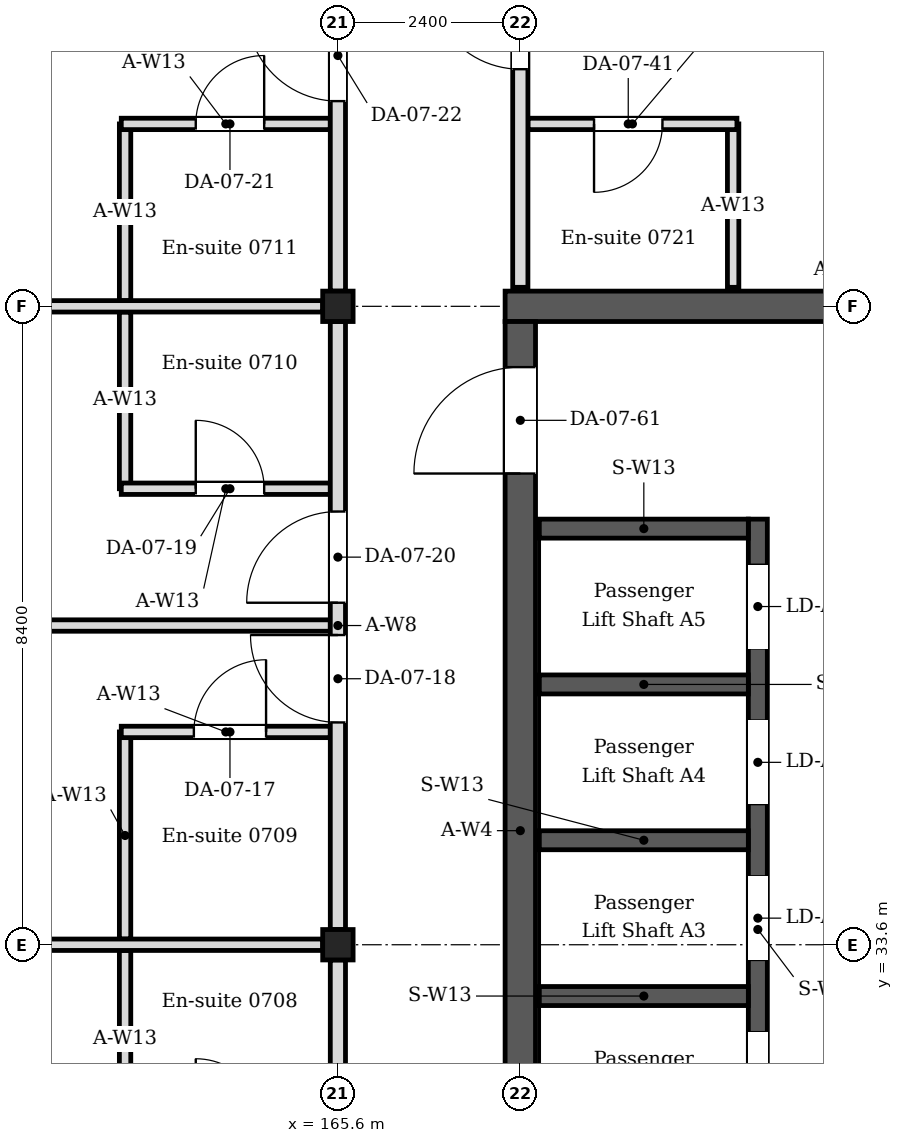
"""IFC4 building model, lengths in metres.
Left out: names, types, materials, properties, quantities, classifications, styles, units other than length and angle.
Written with IfcOpenShell. Run it as: python <this file> out.ifc"""

import sys

from ifc_helpers import new_model, si_unit, direction, frame, frame_2d, origin, origin_2d, place, context, subcontext, project, spatial, rectangle, i_section, extrude, element, fill, save


model = new_model("IFC4")
c1 = context("Model", 3, precision=1e-05, world=origin(), true_north=direction((0.0, 1.0)))
c2 = subcontext(c1, "Body", "Model", "MODEL_VIEW")
j1 = project(units=[si_unit("LENGTHUNIT", "METRE"), si_unit("PLANEANGLEUNIT", "RADIAN")], contexts=[c1])
p1 = place(None, origin())
s1 = spatial("IfcSite", under=j1, at=p1, CompositionType="ELEMENT")
p2 = place(p1, origin())
s2 = spatial("IfcBuilding", under=s1, at=p2, CompositionType="ELEMENT")
p3 = place(p2, frame((0.0, 0.0, 31.2)))
s3 = spatial("IfcBuildingStorey", under=s2, at=p3, CompositionType="ELEMENT", Elevation=31.2)
for number, where, z_axis, x_axis in (
    (1, (165.6, 33.6, 0.0), (0.0, 0.0, 1.0), (1.0, 0.0, 0.0)),
    (2, (165.6, 42.0, 0.0), (0.0, 0.0, 1.0), (1.0, 0.0, 0.0)),
):
    element("IfcColumn", number, at=place(p3, frame(where, z_axis=z_axis, x_axis=x_axis)), inside=s3, PredefinedType="COLUMN", context=c2, shape_type="SweptSolid", body=[
        extrude(i_section(OverallWidth=0.4, OverallDepth=0.4, WebThickness=0.013, FlangeThickness=0.021, FilletRadius=0.022, at=origin_2d()), origin(), (0.0, 0.0, 1.0), 4.2),
    ])
p4 = place(p3, frame((167.8, 42.0, 0.0), z_axis=(0.0, 0.0, 1.0), x_axis=(1.0, 0.0, 0.0)))
e3 = element("IfcWall", 3, at=p4, inside=s3, PredefinedType="SOLIDWALL", context=c2, shape_type="SweptSolid", body=[
    extrude(rectangle(XDim=8.8, YDim=0.4, at=frame_2d((4.4, 0.0))), origin(), (0.0, 0.0, 1.0), 4.05),
])
p5 = place(p3, frame((168.0, 25.4, 0.0), z_axis=(0.0, 0.0, 1.0), x_axis=(0.0, 1.0, 0.0)))
e4 = element("IfcWall", 4, at=p5, inside=s3, PredefinedType="SOLIDWALL", context=c2, shape_type="SweptSolid", body=[
    extrude(rectangle(XDim=16.4, YDim=0.4, at=frame_2d((8.2, 0.0))), origin(), (0.0, 0.0, 1.0), 4.05),
])
p6 = place(p5, frame((1.0, 0.0, 0.0)))
e5 = element("IfcOpeningElement", 5, at=p6, cuts=e4, PredefinedType="OPENING", context=c2, shape_type="SweptSolid", body=[
    extrude(rectangle(XDim=1.0, YDim=2.1, at=frame_2d((0.5, 1.05))), frame((0.0, 0.21, 0.0), z_axis=(0.0, -1.0, 0.0), x_axis=(1.0, 0.0, 0.0)), (0.0, 0.0, 1.0), 0.42),
])
p7 = place(p5, frame((14.4, 0.0, 0.0)))
e6 = element("IfcOpeningElement", 6, at=p7, cuts=e4, PredefinedType="OPENING", context=c2, shape_type="SweptSolid", body=[
    extrude(rectangle(XDim=1.4, YDim=2.1, at=frame_2d((0.7, 1.05))), frame((0.0, 0.21, 0.0), z_axis=(0.0, -1.0, 0.0), x_axis=(1.0, 0.0, 0.0)), (0.0, 0.0, 1.0), 0.42),
])
p8 = place(p3, frame((162.8, 31.2, 0.0), z_axis=(0.0, 0.0, 1.0), x_axis=(0.0, 1.0, 0.0)))
e7 = element("IfcWall", 7, at=p8, inside=s3, PredefinedType="PARTITIONING", context=c2, shape_type="SweptSolid", body=[
    extrude(rectangle(XDim=2.325, YDim=0.15, at=frame_2d((1.163, 0.0))), origin(), (0.0, 0.0, 1.0), 4.05),
])
p9 = place(p3, frame((162.8, 33.675, 0.0), z_axis=(0.0, 0.0, 1.0), x_axis=(0.0, 1.0, 0.0)))
e8 = element("IfcWall", 8, at=p9, inside=s3, PredefinedType="PARTITIONING", context=c2, shape_type="SweptSolid", body=[
    extrude(rectangle(XDim=2.725, YDim=0.15, at=frame_2d((1.362, 0.0))), origin(), (0.0, 0.0, 1.0), 4.05),
])
p10 = place(p3, frame((162.75, 36.4, 0.0), z_axis=(0.0, 0.0, 1.0), x_axis=(1.0, 0.0, 0.0)))
e9 = element("IfcWall", 9, at=p10, inside=s3, PredefinedType="PARTITIONING", context=c2, shape_type="SweptSolid", body=[
    extrude(rectangle(XDim=2.75, YDim=0.15, at=frame_2d((1.375, 0.0))), origin(), (0.0, 0.0, 1.0), 4.05),
])
p11 = place(p10, frame((0.955, 0.0, 0.0)))
e10 = element("IfcOpeningElement", 10, at=p11, cuts=e9, PredefinedType="OPENING", context=c2, shape_type="SweptSolid", body=[
    extrude(rectangle(XDim=0.95, YDim=2.1, at=frame_2d((0.475, 1.05))), frame((0.0, 0.085, 0.0), z_axis=(0.0, -1.0, 0.0), x_axis=(1.0, 0.0, 0.0)), (0.0, 0.0, 1.0), 0.17),
])
p12 = place(p3, frame((162.8, 39.6, 0.0), z_axis=(0.0, 0.0, 1.0), x_axis=(0.0, 1.0, 0.0)))
e11 = element("IfcWall", 11, at=p12, inside=s3, PredefinedType="PARTITIONING", context=c2, shape_type="SweptSolid", body=[
    extrude(rectangle(XDim=2.325, YDim=0.15, at=frame_2d((1.163, 0.0))), origin(), (0.0, 0.0, 1.0), 4.05),
])
p13 = place(p3, frame((162.75, 39.6, 0.0), z_axis=(0.0, 0.0, 1.0), x_axis=(1.0, 0.0, 0.0)))
e12 = element("IfcWall", 12, at=p13, inside=s3, PredefinedType="PARTITIONING", context=c2, shape_type="SweptSolid", body=[
    extrude(rectangle(XDim=2.75, YDim=0.15, at=frame_2d((1.375, 0.0))), origin(), (0.0, 0.0, 1.0), 4.05),
])
p14 = place(p13, frame((0.98, 0.0, 0.0)))
e13 = element("IfcOpeningElement", 13, at=p14, cuts=e12, PredefinedType="OPENING", context=c2, shape_type="SweptSolid", body=[
    extrude(rectangle(XDim=0.9, YDim=2.1, at=frame_2d((0.45, 1.05))), frame((0.0, 0.085, 0.0), z_axis=(0.0, -1.0, 0.0), x_axis=(1.0, 0.0, 0.0)), (0.0, 0.0, 1.0), 0.17),
])
p15 = place(p3, frame((162.8, 42.075, 0.0), z_axis=(0.0, 0.0, 1.0), x_axis=(0.0, 1.0, 0.0)))
e14 = element("IfcWall", 14, at=p15, inside=s3, PredefinedType="PARTITIONING", context=c2, shape_type="SweptSolid", body=[
    extrude(rectangle(XDim=2.325, YDim=0.15, at=frame_2d((1.163, 0.0))), origin(), (0.0, 0.0, 1.0), 4.05),
])
p16 = place(p3, frame((162.75, 44.4, 0.0), z_axis=(0.0, 0.0, 1.0), x_axis=(1.0, 0.0, 0.0)))
e15 = element("IfcWall", 15, at=p16, inside=s3, PredefinedType="PARTITIONING", context=c2, shape_type="SweptSolid", body=[
    extrude(rectangle(XDim=2.75, YDim=0.15, at=frame_2d((1.375, 0.0))), origin(), (0.0, 0.0, 1.0), 4.05),
])
p17 = place(p16, frame((0.98, 0.0, 0.0)))
e16 = element("IfcOpeningElement", 16, at=p17, cuts=e15, PredefinedType="OPENING", context=c2, shape_type="SweptSolid", body=[
    extrude(rectangle(XDim=0.9, YDim=2.1, at=frame_2d((0.45, 1.05))), frame((0.0, 0.085, 0.0), z_axis=(0.0, -1.0, 0.0), x_axis=(1.0, 0.0, 0.0)), (0.0, 0.0, 1.0), 0.17),
])
p18 = place(p3, frame((170.8, 42.25, 0.0), z_axis=(0.0, 0.0, 1.0), x_axis=(0.0, 1.0, 0.0)))
e17 = element("IfcWall", 17, at=p18, inside=s3, PredefinedType="PARTITIONING", context=c2, shape_type="SweptSolid", body=[
    extrude(rectangle(XDim=2.15, YDim=0.15, at=frame_2d((1.075, 0.0))), origin(), (0.0, 0.0, 1.0), 4.05),
])
p19 = place(p3, frame((170.85, 44.4, 0.0), z_axis=(0.0, 0.0, 1.0), x_axis=(-1.0, 0.0, 0.0)))
e18 = element("IfcWall", 18, at=p19, inside=s3, PredefinedType="PARTITIONING", context=c2, shape_type="SweptSolid", body=[
    extrude(rectangle(XDim=2.75, YDim=0.15, at=frame_2d((1.375, 0.0))), origin(), (0.0, 0.0, 1.0), 4.05),
])
p20 = place(p19, frame((0.98, 0.0, 0.0)))
e19 = element("IfcOpeningElement", 19, at=p20, cuts=e18, PredefinedType="OPENING", context=c2, shape_type="SweptSolid", body=[
    extrude(rectangle(XDim=0.9, YDim=2.1, at=frame_2d((0.45, 1.05))), frame((0.0, 0.085, 0.0), z_axis=(0.0, -1.0, 0.0), x_axis=(1.0, 0.0, 0.0)), (0.0, 0.0, 1.0), 0.17),
])
for number, where, z_axis, x_axis in (
    (20, (157.4, 33.6, 0.0), (0.0, 0.0, 1.0), (1.0, 0.0, 0.0)),
    (21, (157.4, 42.0, 0.0), (0.0, 0.0, 1.0), (1.0, 0.0, 0.0)),
):
    element("IfcWall", number, at=place(p3, frame(where, z_axis=z_axis, x_axis=x_axis)), inside=s3, PredefinedType="PARTITIONING", context=c2, shape_type="SweptSolid", body=[
        extrude(rectangle(XDim=8.0, YDim=0.15, at=frame_2d((4.0, 0.0))), origin(), (0.0, 0.0, 1.0), 3.604),
    ])
p21 = place(p3, frame((156.98, 37.8, 0.0), z_axis=(0.0, 0.0, 1.0), x_axis=(1.0, 0.0, 0.0)))
e22 = element("IfcWall", 22, at=p21, inside=s3, PredefinedType="PARTITIONING", context=c2, shape_type="SweptSolid", body=[
    extrude(rectangle(XDim=8.52, YDim=0.15, at=frame_2d((4.26, 0.0))), origin(), (0.0, 0.0, 1.0), 3.604),
])
p22 = place(p3, frame((165.6, 25.4, 0.0), z_axis=(0.0, 0.0, 1.0), x_axis=(0.0, 1.0, 0.0)))
e23 = element("IfcWall", 23, at=p22, inside=s3, PredefinedType="PARTITIONING", context=c2, shape_type="SweptSolid", body=[
    extrude(rectangle(XDim=8.0, YDim=0.2, at=frame_2d((4.0, 0.0))), origin(), (0.0, 0.0, 1.0), 3.45),
])
p23 = place(p22, frame((2.5, 0.0, 0.0)))
e24 = element("IfcOpeningElement", 24, at=p23, cuts=e23, PredefinedType="OPENING", context=c2, shape_type="SweptSolid", body=[
    extrude(rectangle(XDim=1.2, YDim=2.1, at=frame_2d((0.6, 1.05))), frame((0.0, 0.11, 0.0), z_axis=(0.0, -1.0, 0.0), x_axis=(1.0, 0.0, 0.0)), (0.0, 0.0, 1.0), 0.22),
])
p24 = place(p22, frame((4.3, 0.0, 0.0)))
e25 = element("IfcOpeningElement", 25, at=p24, cuts=e23, PredefinedType="OPENING", context=c2, shape_type="SweptSolid", body=[
    extrude(rectangle(XDim=1.2, YDim=2.1, at=frame_2d((0.6, 1.05))), frame((0.0, 0.11, 0.0), z_axis=(0.0, -1.0, 0.0), x_axis=(1.0, 0.0, 0.0)), (0.0, 0.0, 1.0), 0.22),
])
p25 = place(p3, frame((165.6, 33.8, 0.0), z_axis=(0.0, 0.0, 1.0), x_axis=(0.0, 1.0, 0.0)))
e26 = element("IfcWall", 26, at=p25, inside=s3, PredefinedType="PARTITIONING", context=c2, shape_type="SweptSolid", body=[
    extrude(rectangle(XDim=8.0, YDim=0.2, at=frame_2d((4.0, 0.0))), origin(), (0.0, 0.0, 1.0), 3.45),
])
p26 = place(p25, frame((2.725, 0.0, 0.0)))
e27 = element("IfcOpeningElement", 27, at=p26, cuts=e26, PredefinedType="OPENING", context=c2, shape_type="SweptSolid", body=[
    extrude(rectangle(XDim=1.15, YDim=2.1, at=frame_2d((0.575, 1.05))), frame((0.0, 0.11, 0.0), z_axis=(0.0, -1.0, 0.0), x_axis=(1.0, 0.0, 0.0)), (0.0, 0.0, 1.0), 0.22),
])
p27 = place(p25, frame((4.3, 0.0, 0.0)))
e28 = element("IfcOpeningElement", 28, at=p27, cuts=e26, PredefinedType="OPENING", context=c2, shape_type="SweptSolid", body=[
    extrude(rectangle(XDim=1.2, YDim=2.1, at=frame_2d((0.6, 1.05))), frame((0.0, 0.11, 0.0), z_axis=(0.0, -1.0, 0.0), x_axis=(1.0, 0.0, 0.0)), (0.0, 0.0, 1.0), 0.22),
])
p28 = place(p3, frame((165.6, 42.2, 0.0), z_axis=(0.0, 0.0, 1.0), x_axis=(0.0, 1.0, 0.0)))
e29 = element("IfcWall", 29, at=p28, inside=s3, PredefinedType="PARTITIONING", context=c2, shape_type="SweptSolid", body=[
    extrude(rectangle(XDim=8.0, YDim=0.2, at=frame_2d((4.0, 0.0))), origin(), (0.0, 0.0, 1.0), 3.45),
])
p29 = place(p28, frame((2.5, 0.0, 0.0)))
e30 = element("IfcOpeningElement", 30, at=p29, cuts=e29, PredefinedType="OPENING", context=c2, shape_type="SweptSolid", body=[
    extrude(rectangle(XDim=1.2, YDim=2.1, at=frame_2d((0.6, 1.05))), frame((0.0, 0.11, 0.0), z_axis=(0.0, -1.0, 0.0), x_axis=(1.0, 0.0, 0.0)), (0.0, 0.0, 1.0), 0.22),
])
p30 = place(p28, frame((4.3, 0.0, 0.0)))
e31 = element("IfcOpeningElement", 31, at=p30, cuts=e29, PredefinedType="OPENING", context=c2, shape_type="SweptSolid", body=[
    extrude(rectangle(XDim=1.2, YDim=2.1, at=frame_2d((0.6, 1.05))), frame((0.0, 0.11, 0.0), z_axis=(0.0, -1.0, 0.0), x_axis=(1.0, 0.0, 0.0)), (0.0, 0.0, 1.0), 0.22),
])
p31 = place(p3, frame((168.0, 42.25, 0.0), z_axis=(0.0, 0.0, 1.0), x_axis=(0.0, 1.0, 0.0)))
e32 = element("IfcWall", 32, at=p31, inside=s3, PredefinedType="PARTITIONING", context=c2, shape_type="SweptSolid", body=[
    extrude(rectangle(XDim=7.95, YDim=0.2, at=frame_2d((3.975, 0.0))), origin(), (0.0, 0.0, 1.0), 3.45),
])
p32 = place(p31, frame((2.87, 0.0, 0.0)))
e33 = element("IfcOpeningElement", 33, at=p32, cuts=e32, PredefinedType="OPENING", context=c2, shape_type="SweptSolid", body=[
    extrude(rectangle(XDim=1.2, YDim=2.1, at=frame_2d((0.6, 1.05))), frame((0.0, 0.11, 0.0), z_axis=(0.0, -1.0, 0.0), x_axis=(1.0, 0.0, 0.0)), (0.0, 0.0, 1.0), 0.22),
])
p33 = place(p31, frame((4.87, 0.0, 0.0)))
e34 = element("IfcOpeningElement", 34, at=p33, cuts=e32, PredefinedType="OPENING", context=c2, shape_type="SweptSolid", body=[
    extrude(rectangle(XDim=1.2, YDim=2.1, at=frame_2d((0.6, 1.05))), frame((0.0, 0.11, 0.0), z_axis=(0.0, -1.0, 0.0), x_axis=(1.0, 0.0, 0.0)), (0.0, 0.0, 1.0), 0.22),
])
p34 = place(p3, frame((171.125, 28.3, 0.0), z_axis=(0.0, 0.0, 1.0), x_axis=(0.0, 1.0, 0.0)))
e35 = element("IfcWall", 35, at=p34, inside=s3, PredefinedType="SOLIDWALL", context=c2, shape_type="SweptSolid", body=[
    extrude(rectangle(XDim=10.9, YDim=0.25, at=frame_2d((5.45, 0.0))), origin(), (0.0, 0.0, 1.0), 4.05),
])
p35 = place(p34, frame((0.8, 0.0, 0.0)))
e36 = element("IfcOpeningElement", 36, at=p35, cuts=e35, PredefinedType="OPENING", context=c2, shape_type="SweptSolid", body=[
    extrude(rectangle(XDim=1.1, YDim=2.1, at=frame_2d((0.55, 1.05))), frame((0.0, 0.135, 0.0), z_axis=(0.0, -1.0, 0.0), x_axis=(1.0, 0.0, 0.0)), (0.0, 0.0, 1.0), 0.27),
])
p36 = place(p34, frame((3.05, 0.0, 0.0)))
e37 = element("IfcOpeningElement", 37, at=p36, cuts=e35, PredefinedType="OPENING", context=c2, shape_type="SweptSolid", body=[
    extrude(rectangle(XDim=1.1, YDim=2.1, at=frame_2d((0.55, 1.05))), frame((0.0, 0.135, 0.0), z_axis=(0.0, -1.0, 0.0), x_axis=(1.0, 0.0, 0.0)), (0.0, 0.0, 1.0), 0.27),
])
p37 = place(p34, frame((5.1, 0.0, 0.0)))
e38 = element("IfcOpeningElement", 38, at=p37, cuts=e35, PredefinedType="OPENING", context=c2, shape_type="SweptSolid", body=[
    extrude(rectangle(XDim=1.1, YDim=2.1, at=frame_2d((0.55, 1.05))), frame((0.0, 0.135, 0.0), z_axis=(0.0, -1.0, 0.0), x_axis=(1.0, 0.0, 0.0)), (0.0, 0.0, 1.0), 0.27),
])
p38 = place(p34, frame((7.15, 0.0, 0.0)))
e39 = element("IfcOpeningElement", 39, at=p38, cuts=e35, PredefinedType="OPENING", context=c2, shape_type="SweptSolid", body=[
    extrude(rectangle(XDim=1.1, YDim=2.1, at=frame_2d((0.55, 1.05))), frame((0.0, 0.135, 0.0), z_axis=(0.0, -1.0, 0.0), x_axis=(1.0, 0.0, 0.0)), (0.0, 0.0, 1.0), 0.27),
])
p39 = place(p34, frame((9.2, 0.0, 0.0)))
e40 = element("IfcOpeningElement", 40, at=p39, cuts=e35, PredefinedType="OPENING", context=c2, shape_type="SweptSolid", body=[
    extrude(rectangle(XDim=1.1, YDim=2.1, at=frame_2d((0.55, 1.05))), frame((0.0, 0.135, 0.0), z_axis=(0.0, -1.0, 0.0), x_axis=(1.0, 0.0, 0.0)), (0.0, 0.0, 1.0), 0.27),
])
for number, where, z_axis, x_axis in (
    (41, (168.25, 32.925, 0.0), (0.0, 0.0, 1.0), (1.0, 0.0, 0.0)),
    (42, (168.25, 34.975, 0.0), (0.0, 0.0, 1.0), (1.0, 0.0, 0.0)),
    (43, (168.25, 37.025, 0.0), (0.0, 0.0, 1.0), (1.0, 0.0, 0.0)),
    (44, (168.25, 39.075, 0.0), (0.0, 0.0, 1.0), (1.0, 0.0, 0.0)),
):
    element("IfcWall", number, at=place(p3, frame(where, z_axis=z_axis, x_axis=x_axis)), inside=s3, PredefinedType="SOLIDWALL", context=c2, shape_type="SweptSolid", body=[
        extrude(rectangle(XDim=2.75, YDim=0.25, at=frame_2d((1.375, 0.0))), origin(), (0.0, 0.0, 1.0), 4.05),
    ])
p40 = place(p11, origin())
e45 = element("IfcDoor", 45, at=p40, inside=s3, OperationType="SINGLE_SWING_RIGHT", PredefinedType="DOOR", context=c2, shape_type="SweptSolid", body=[
    extrude(rectangle(XDim=0.95, YDim=2.1, at=frame_2d((0.475, 1.05))), frame((0.0, 0.025, 0.0), z_axis=(0.0, -1.0, 0.0), x_axis=(1.0, 0.0, 0.0)), (0.0, 0.0, 1.0), 0.05),
])
fill(e10, e45)
p41 = place(p26, origin())
e46 = element("IfcDoor", 46, at=p41, inside=s3, OperationType="SINGLE_SWING_RIGHT", PredefinedType="DOOR", context=c2, shape_type="SweptSolid", body=[
    extrude(rectangle(XDim=1.15, YDim=2.1, at=frame_2d((0.575, 1.05))), frame((0.0, 0.025, 0.0), z_axis=(0.0, -1.0, 0.0), x_axis=(1.0, 0.0, 0.0)), (0.0, 0.0, 1.0), 0.05),
])
fill(e27, e46)
p42 = place(p14, origin())
e47 = element("IfcDoor", 47, at=p42, inside=s3, OperationType="SINGLE_SWING_LEFT", PredefinedType="DOOR", context=c2, shape_type="SweptSolid", body=[
    extrude(rectangle(XDim=0.9, YDim=2.1, at=frame_2d((0.45, 1.05))), frame((0.0, 0.025, 0.0), z_axis=(0.0, -1.0, 0.0), x_axis=(1.0, 0.0, 0.0)), (0.0, 0.0, 1.0), 0.05),
])
fill(e13, e47)
p43 = place(p27, origin())
e48 = element("IfcDoor", 48, at=p43, inside=s3, OperationType="SINGLE_SWING_LEFT", PredefinedType="DOOR", context=c2, shape_type="SweptSolid", body=[
    extrude(rectangle(XDim=1.2, YDim=2.1, at=frame_2d((0.6, 1.05))), frame((0.0, 0.025, 0.0), z_axis=(0.0, -1.0, 0.0), x_axis=(1.0, 0.0, 0.0)), (0.0, 0.0, 1.0), 0.05),
])
fill(e28, e48)
p44 = place(p17, origin())
e49 = element("IfcDoor", 49, at=p44, inside=s3, OperationType="SINGLE_SWING_RIGHT", PredefinedType="DOOR", context=c2, shape_type="SweptSolid", body=[
    extrude(rectangle(XDim=0.9, YDim=2.1, at=frame_2d((0.45, 1.05))), frame((0.0, 0.025, 0.0), z_axis=(0.0, -1.0, 0.0), x_axis=(1.0, 0.0, 0.0)), (0.0, 0.0, 1.0), 0.05),
])
fill(e16, e49)
p45 = place(p29, origin())
e50 = element("IfcDoor", 50, at=p45, inside=s3, OperationType="SINGLE_SWING_RIGHT", PredefinedType="DOOR", context=c2, shape_type="SweptSolid", body=[
    extrude(rectangle(XDim=1.2, YDim=2.1, at=frame_2d((0.6, 1.05))), frame((0.0, 0.025, 0.0), z_axis=(0.0, -1.0, 0.0), x_axis=(1.0, 0.0, 0.0)), (0.0, 0.0, 1.0), 0.05),
])
fill(e30, e50)
p46 = place(p20, origin())
e51 = element("IfcDoor", 51, at=p46, inside=s3, OperationType="SINGLE_SWING_RIGHT", PredefinedType="DOOR", context=c2, shape_type="SweptSolid", body=[
    extrude(rectangle(XDim=0.9, YDim=2.1, at=frame_2d((0.45, 1.05))), frame((0.0, 0.025, 0.0), z_axis=(0.0, -1.0, 0.0), x_axis=(1.0, 0.0, 0.0)), (0.0, 0.0, 1.0), 0.05),
])
fill(e19, e51)
p47 = place(p32, origin())
e52 = element("IfcDoor", 52, at=p47, inside=s3, OperationType="SINGLE_SWING_RIGHT", PredefinedType="DOOR", context=c2, shape_type="SweptSolid", body=[
    extrude(rectangle(XDim=1.2, YDim=2.1, at=frame_2d((0.6, 1.05))), frame((0.0, 0.025, 0.0), z_axis=(0.0, -1.0, 0.0), x_axis=(1.0, 0.0, 0.0)), (0.0, 0.0, 1.0), 0.05),
])
fill(e33, e52)
p48 = place(p36, origin())
e53 = element("IfcDoor", 53, at=p48, inside=s3, OperationType="SLIDING_TO_LEFT", PredefinedType="DOOR", context=c2, shape_type="SweptSolid", body=[
    extrude(rectangle(XDim=1.1, YDim=2.1, at=frame_2d((0.55, 1.05))), frame((0.0, 0.025, 0.0), z_axis=(0.0, -1.0, 0.0), x_axis=(1.0, 0.0, 0.0)), (0.0, 0.0, 1.0), 0.05),
])
fill(e37, e53)
p49 = place(p37, origin())
e54 = element("IfcDoor", 54, at=p49, inside=s3, OperationType="SLIDING_TO_LEFT", PredefinedType="DOOR", context=c2, shape_type="SweptSolid", body=[
    extrude(rectangle(XDim=1.1, YDim=2.1, at=frame_2d((0.55, 1.05))), frame((0.0, 0.025, 0.0), z_axis=(0.0, -1.0, 0.0), x_axis=(1.0, 0.0, 0.0)), (0.0, 0.0, 1.0), 0.05),
])
fill(e38, e54)
p50 = place(p38, origin())
e55 = element("IfcDoor", 55, at=p50, inside=s3, OperationType="SLIDING_TO_LEFT", PredefinedType="DOOR", context=c2, shape_type="SweptSolid", body=[
    extrude(rectangle(XDim=1.1, YDim=2.1, at=frame_2d((0.55, 1.05))), frame((0.0, 0.025, 0.0), z_axis=(0.0, -1.0, 0.0), x_axis=(1.0, 0.0, 0.0)), (0.0, 0.0, 1.0), 0.05),
])
fill(e39, e55)
p51 = place(p39, origin())
e56 = element("IfcDoor", 56, at=p51, inside=s3, OperationType="SLIDING_TO_LEFT", PredefinedType="DOOR", context=c2, shape_type="SweptSolid", body=[
    extrude(rectangle(XDim=1.1, YDim=2.1, at=frame_2d((0.55, 1.05))), frame((0.0, 0.025, 0.0), z_axis=(0.0, -1.0, 0.0), x_axis=(1.0, 0.0, 0.0)), (0.0, 0.0, 1.0), 0.05),
])
fill(e40, e56)
p52 = place(p7, origin())
e57 = element("IfcDoor", 57, at=p52, inside=s3, OperationType="DOUBLE_DOOR_DOUBLE_SWING", PredefinedType="DOOR", context=c2, shape_type="SweptSolid", body=[
    extrude(rectangle(XDim=1.4, YDim=2.1, at=frame_2d((0.7, 1.05))), frame((0.0, 0.025, 0.0), z_axis=(0.0, -1.0, 0.0), x_axis=(1.0, 0.0, 0.0)), (0.0, 0.0, 1.0), 0.05),
])
fill(e6, e57)
save(model, sys.argv[1])
